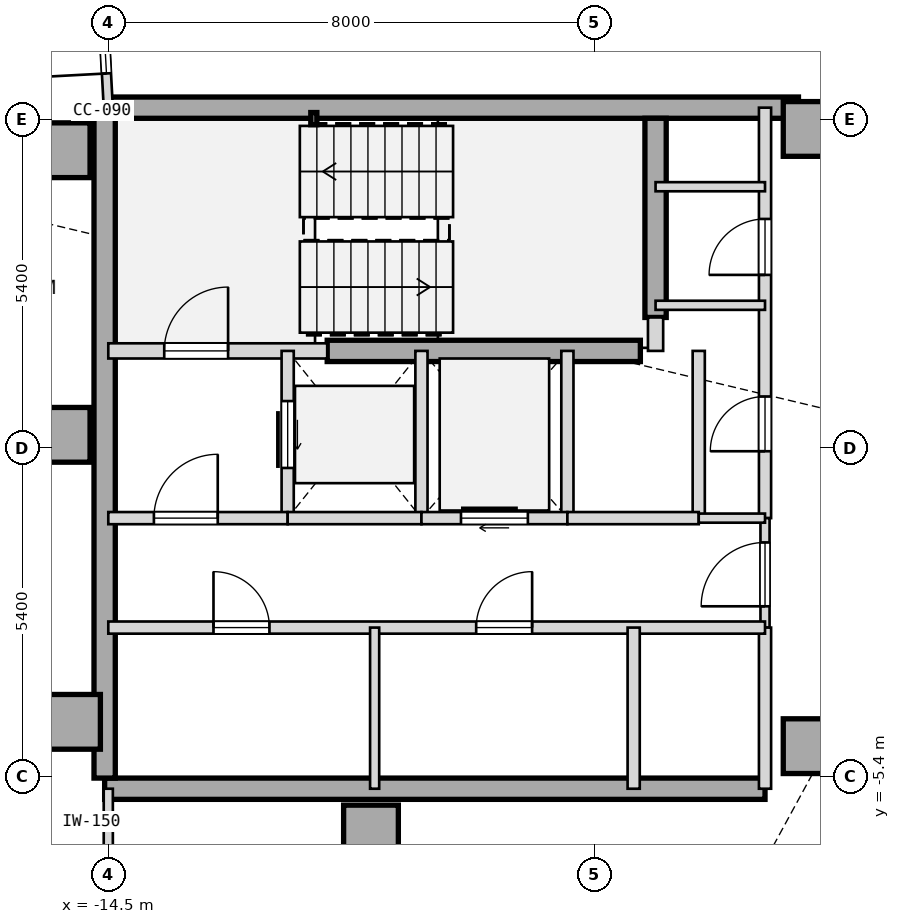
"""IFC4 building model, lengths in metres.
Left out: names, types, materials, properties, quantities, classifications, styles, units other than length and angle.
Written with IfcOpenShell. Run it as: python <this file> out.ifc"""

import sys

from ifc_helpers import new_model, si_unit, direction, frame, frame_2d, origin, origin_2d, place, context, subcontext, project, spatial, rectangle, hollow_rectangle, extrude, element, fill, save


model = new_model("IFC4")
c1 = context("Model", 3, precision=1e-05, world=origin(), true_north=direction((0.0, 1.0)))
c2 = subcontext(c1, "Body", "Model", "MODEL_VIEW")
j1 = project(units=[si_unit("LENGTHUNIT", "METRE"), si_unit("PLANEANGLEUNIT", "RADIAN")], contexts=[c1])
p1 = place(None, origin())
s1 = spatial("IfcSite", under=j1, at=p1, CompositionType="ELEMENT")
p2 = place(p1, origin())
s2 = spatial("IfcBuilding", under=s1, at=p2, CompositionType="ELEMENT")
p3 = place(p2, frame((0.0, 0.0, 305.55)))
s3 = spatial("IfcBuildingStorey", under=s2, at=p3, CompositionType="ELEMENT", Elevation=305.55)
for number, where, z_axis, x_axis in (
    (1, (-15.25, 4.9, 0.0), (0.0, 0.0, 1.0), (1.0, 0.0, 0.0)),
    (2, (-15.25, 0.22, 0.0), (0.0, 0.0, 1.0), (1.0, 0.0, 0.0)),
    (3, (-15.08, -4.5, 0.0), (0.0, 0.0, 1.0), (1.0, 0.0, 0.0)),
    (4, (-10.18, -6.32, 0.0), (0.0, 0.0, 1.0), (1.0, 0.0, 0.0)),
    (5, (-2.95, -4.9, 0.0), (0.0, 0.0, 1.0), (1.0, 0.0, 0.0)),
    (6, (-2.95, 5.25, 0.0), (0.0, 0.0, 1.0), (1.0, 0.0, 0.0)),
):
    element("IfcColumn", number, at=place(p3, frame(where, z_axis=z_axis, x_axis=x_axis)), inside=s3, PredefinedType="COLUMN", context=c2, shape_type="SweptSolid", body=[
        extrude(rectangle(XDim=0.9, YDim=0.9, at=origin_2d()), origin(), (0.0, 0.0, 1.0), 6.45),
    ])
p4 = place(p3, frame((-14.56, 5.6, 0.0), z_axis=(0.0, 0.0, 1.0), x_axis=(1.0, 0.0, 0.0)))
e7 = element("IfcWall", 7, at=p4, inside=s3, PredefinedType="SHEAR", context=c2, shape_type="SweptSolid", body=[
    extrude(rectangle(XDim=11.41, YDim=0.35, at=frame_2d((5.705, 0.0))), origin(), (0.0, 0.0, 1.0), 6.1),
])
p5 = place(p3, frame((-14.56, -5.6, 0.0), z_axis=(0.0, 0.0, 1.0), x_axis=(1.0, 0.0, 0.0)))
e8 = element("IfcWall", 8, at=p5, inside=s3, PredefinedType="SHEAR", context=c2, shape_type="SweptSolid", body=[
    extrude(rectangle(XDim=10.86, YDim=0.35, at=frame_2d((5.43, 0.0))), origin(), (0.0, 0.0, 1.0), 6.1),
])
p6 = place(p3, frame((-14.56, -5.425, 0.0), z_axis=(0.0, 0.0, 1.0), x_axis=(0.0, 1.0, 0.0)))
e9 = element("IfcWall", 9, at=p6, inside=s3, PredefinedType="SHEAR", context=c2, shape_type="SweptSolid", body=[
    extrude(rectangle(XDim=10.85, YDim=0.35, at=frame_2d((5.425, 0.0))), origin(), (0.0, 0.0, 1.0), 6.1),
])
p7 = place(p3, frame((-5.5, 2.15, 0.0), z_axis=(0.0, 0.0, 1.0), x_axis=(0.0, 1.0, 0.0)))
e10 = element("IfcWall", 10, at=p7, inside=s3, PredefinedType="SHEAR", context=c2, shape_type="SweptSolid", body=[
    extrude(rectangle(XDim=3.275, YDim=0.35, at=frame_2d((1.638, 0.0))), origin(), (0.0, 0.0, 1.0), 6.1),
])
p8 = place(p3, frame((-10.9, 1.6, 0.0), z_axis=(0.0, 0.0, 1.0), x_axis=(1.0, 0.0, 0.0)))
e11 = element("IfcWall", 11, at=p8, inside=s3, PredefinedType="SHEAR", context=c2, shape_type="SweptSolid", body=[
    extrude(rectangle(XDim=5.15, YDim=0.35, at=frame_2d((2.575, 0.0))), origin(), (0.0, 0.0, 1.0), 6.1),
])
p9 = place(p3, frame((-11.12, 5.42, 0.0), z_axis=(0.0, 0.0, 1.0), x_axis=(1.0, 0.0, 0.0)))
e12 = element("IfcColumn", 12, at=p9, inside=s3, PredefinedType="COLUMN", context=c2, shape_type="SweptSolid", body=[
    extrude(hollow_rectangle(XDim=0.1, YDim=0.2, WallThickness=0.008, at=origin_2d()), origin(), (0.0, 0.0, 1.0), 6.45),
])
for number, where, z_axis, x_axis in (
    (13, (-7.918, -17.756, 0.0), (0.0, 0.0, 1.0), (0.914, 0.407, 0.0)),
    (14, (7.918, 17.756, 0.0), (0.0, 0.0, 1.0), (-0.914, -0.407, 0.0)),
):
    element("IfcWall", number, at=place(p3, frame(where, z_axis=z_axis, x_axis=x_axis)), inside=s3, PredefinedType="STANDARD", context=c2, shape_type="SweptSolid", body=[
        extrude(rectangle(XDim=28.91, YDim=0.3, at=frame_2d((14.455, 0.0))), origin(), (0.0, 0.0, 1.0), 6.1),
    ])
p10 = place(p3, frame((-19.783, 2.637, 0.0), z_axis=(0.0, 0.0, 1.0), x_axis=(0.406736369999, -0.913545579224, 0.0)))
e15 = element("IfcWall", 15, at=p10, inside=s3, PredefinedType="STANDARD", context=c2, shape_type="SweptSolid", body=[
    extrude(rectangle(XDim=20.91, YDim=0.3, at=frame_2d((10.455, 0.0))), origin(), (0.0, 0.0, 1.0), 6.1),
])
p11 = place(p3, frame((18.04, 25.361, 0.0), z_axis=(0.0, 0.0, 1.0), x_axis=(-0.913545087995, -0.406737473317, 0.0)))
e16 = element("IfcWall", 16, at=p11, inside=s3, PredefinedType="PARAPET", context=c2, shape_type="SweptSolid", body=[
    extrude(rectangle(XDim=51.158, YDim=0.22, at=frame_2d((25.579, 0.0))), origin(), (0.0, 0.0, 1.0), 1.2),
])
p12 = place(p3, frame((-14.5, 1.6, 0.0), z_axis=(0.0, 0.0, 1.0), x_axis=(1.0, 0.0, 0.0)))
e17 = element("IfcWall", 17, at=p12, inside=s3, PredefinedType="STANDARD", context=c2, shape_type="SweptSolid", body=[
    extrude(rectangle(XDim=3.6, YDim=0.25, at=frame_2d((1.8, 0.0))), origin(), (0.0, 0.0, 1.0), 6.1),
])
p13 = place(p12, frame((0.92, 0.0, 0.0)))
e18 = element("IfcOpeningElement", 18, at=p13, cuts=e17, PredefinedType="OPENING", context=c2, shape_type="SweptSolid", body=[
    extrude(rectangle(XDim=1.05, YDim=2.15, at=frame_2d((0.525, 1.075))), frame((0.0, 0.135, 0.0), z_axis=(0.0, -1.0, 0.0), x_axis=(1.0, 0.0, 0.0)), (0.0, 0.0, 1.0), 0.27),
])
p14 = place(p3, frame((-5.5, 1.6, 0.0), z_axis=(0.0, 0.0, 1.0), x_axis=(0.0, 1.0, 0.0)))
e19 = element("IfcWall", 19, at=p14, inside=s3, PredefinedType="STANDARD", context=c2, shape_type="SweptSolid", body=[
    extrude(rectangle(XDim=0.55, YDim=0.25, at=frame_2d((0.275, 0.0))), origin(), (0.0, 0.0, 1.0), 6.1),
])
p15 = place(p3, frame((-3.7, -1.15, 0.0), z_axis=(0.0, 0.0, 1.0), x_axis=(0.0, 1.0, 0.0)))
e20 = element("IfcWall", 20, at=p15, inside=s3, PredefinedType="STANDARD", context=c2, shape_type="SweptSolid", body=[
    extrude(rectangle(XDim=6.75, YDim=0.2, at=frame_2d((3.375, 0.0))), origin(), (0.0, 0.0, 1.0), 6.1),
])
p16 = place(p15, frame((1.1, 0.0, 0.0)))
e21 = element("IfcOpeningElement", 21, at=p16, cuts=e20, PredefinedType="OPENING", context=c2, shape_type="SweptSolid", body=[
    extrude(rectangle(XDim=0.9, YDim=2.15, at=frame_2d((0.45, 1.075))), frame((0.0, 0.11, 0.0), z_axis=(0.0, -1.0, 0.0), x_axis=(1.0, 0.0, 0.0)), (0.0, 0.0, 1.0), 0.22),
])
p17 = place(p15, frame((4.0, 0.0, 0.0)))
e22 = element("IfcOpeningElement", 22, at=p17, cuts=e20, PredefinedType="OPENING", context=c2, shape_type="SweptSolid", body=[
    extrude(rectangle(XDim=0.92, YDim=2.15, at=frame_2d((0.46, 1.075))), frame((0.0, 0.11, 0.0), z_axis=(0.0, -1.0, 0.0), x_axis=(1.0, 0.0, 0.0)), (0.0, 0.0, 1.0), 0.22),
])
p18 = place(p3, frame((-3.7, -2.95, 0.0), z_axis=(0.0, 0.0, 1.0), x_axis=(0.0, 1.0, 0.0)))
e23 = element("IfcWall", 23, at=p18, inside=s3, PredefinedType="PARTITIONING", context=c2, shape_type="SweptSolid", body=[
    extrude(rectangle(XDim=1.8, YDim=0.15, at=frame_2d((0.9, 0.0))), origin(), (0.0, 0.0, 1.0), 6.1),
])
p19 = place(p18, frame((0.35, 0.0, 0.0)))
e24 = element("IfcOpeningElement", 24, at=p19, cuts=e23, PredefinedType="OPENING", context=c2, shape_type="SweptSolid", body=[
    extrude(rectangle(XDim=1.05, YDim=2.18, at=frame_2d((0.525, 1.09))), frame((0.0, 0.085, 0.0), z_axis=(0.0, -1.0, 0.0), x_axis=(1.0, 0.0, 0.0)), (0.0, 0.0, 1.0), 0.17),
])
p20 = place(p3, frame((-3.7, -5.6, 0.0), z_axis=(0.0, 0.0, 1.0), x_axis=(0.0, 1.0, 0.0)))
e25 = element("IfcWall", 25, at=p20, inside=s3, PredefinedType="STANDARD", context=c2, shape_type="SweptSolid", body=[
    extrude(rectangle(XDim=2.65, YDim=0.2, at=frame_2d((1.325, 0.0))), origin(), (0.0, 0.0, 1.0), 6.1),
])
p21 = place(p3, frame((-11.55, -1.15, 0.0), z_axis=(0.0, 0.0, 1.0), x_axis=(0.0, 1.0, 0.0)))
e26 = element("IfcWall", 26, at=p21, inside=s3, PredefinedType="STANDARD", context=c2, shape_type="SweptSolid", body=[
    extrude(rectangle(XDim=2.75, YDim=0.2, at=frame_2d((1.375, 0.0))), origin(), (0.0, 0.0, 1.0), 6.1),
])
p22 = place(p21, frame((0.825, 0.0, 0.0)))
e27 = element("IfcOpeningElement", 27, at=p22, cuts=e26, PredefinedType="OPENING", context=c2, shape_type="SweptSolid", body=[
    extrude(rectangle(XDim=1.1, YDim=2.15, at=frame_2d((0.55, 1.075))), frame((0.0, 0.11, 0.0), z_axis=(0.0, -1.0, 0.0), x_axis=(1.0, 0.0, 0.0)), (0.0, 0.0, 1.0), 0.22),
])
p23 = place(p3, frame((-9.35, -1.15, 0.0), z_axis=(0.0, 0.0, 1.0), x_axis=(0.0, 1.0, 0.0)))
e28 = element("IfcWall", 28, at=p23, inside=s3, PredefinedType="STANDARD", context=c2, shape_type="SweptSolid", body=[
    extrude(rectangle(XDim=2.75, YDim=0.2, at=frame_2d((1.375, 0.0))), origin(), (0.0, 0.0, 1.0), 6.1),
])
p24 = place(p3, frame((-14.5, -1.15, 0.0), z_axis=(0.0, 0.0, 1.0), x_axis=(1.0, 0.0, 0.0)))
e29 = element("IfcWall", 29, at=p24, inside=s3, PredefinedType="STANDARD", context=c2, shape_type="SweptSolid", body=[
    extrude(rectangle(XDim=2.95, YDim=0.2, at=frame_2d((1.475, 0.0))), origin(), (0.0, 0.0, 1.0), 6.1),
])
p25 = place(p24, frame((0.75, 0.0, 0.0)))
e30 = element("IfcOpeningElement", 30, at=p25, cuts=e29, PredefinedType="OPENING", context=c2, shape_type="SweptSolid", body=[
    extrude(rectangle(XDim=1.05, YDim=2.18, at=frame_2d((0.525, 1.09))), frame((0.0, 0.11, 0.0), z_axis=(0.0, -1.0, 0.0), x_axis=(1.0, 0.0, 0.0)), (0.0, 0.0, 1.0), 0.22),
])
p26 = place(p3, frame((-11.55, -1.15, 0.0), z_axis=(0.0, 0.0, 1.0), x_axis=(1.0, 0.0, 0.0)))
e31 = element("IfcWall", 31, at=p26, inside=s3, PredefinedType="STANDARD", context=c2, shape_type="SweptSolid", body=[
    extrude(rectangle(XDim=2.2, YDim=0.2, at=frame_2d((1.1, 0.0))), origin(), (0.0, 0.0, 1.0), 6.1),
])
p27 = place(p3, frame((-6.95, -1.15, 0.0), z_axis=(0.0, 0.0, 1.0), x_axis=(0.0, 1.0, 0.0)))
e32 = element("IfcWall", 32, at=p27, inside=s3, PredefinedType="STANDARD", context=c2, shape_type="SweptSolid", body=[
    extrude(rectangle(XDim=2.75, YDim=0.2, at=frame_2d((1.375, 0.0))), origin(), (0.0, 0.0, 1.0), 6.1),
])
p28 = place(p3, frame((-9.35, -1.15, 0.0), z_axis=(0.0, 0.0, 1.0), x_axis=(1.0, 0.0, 0.0)))
e33 = element("IfcWall", 33, at=p28, inside=s3, PredefinedType="STANDARD", context=c2, shape_type="SweptSolid", body=[
    extrude(rectangle(XDim=2.4, YDim=0.2, at=frame_2d((1.2, 0.0))), origin(), (0.0, 0.0, 1.0), 6.1),
])
p29 = place(p28, frame((0.65, 0.0, 0.0)))
e34 = element("IfcOpeningElement", 34, at=p29, cuts=e33, PredefinedType="OPENING", context=c2, shape_type="SweptSolid", body=[
    extrude(rectangle(XDim=1.1, YDim=2.15, at=frame_2d((0.55, 1.075))), frame((0.0, 0.11, 0.0), z_axis=(0.0, -1.0, 0.0), x_axis=(1.0, 0.0, 0.0)), (0.0, 0.0, 1.0), 0.22),
])
p30 = place(p3, frame((-4.79, -1.15, 0.0), z_axis=(0.0, 0.0, 1.0), x_axis=(0.0, 1.0, 0.0)))
e35 = element("IfcWall", 35, at=p30, inside=s3, PredefinedType="STANDARD", context=c2, shape_type="SweptSolid", body=[
    extrude(rectangle(XDim=2.75, YDim=0.2, at=frame_2d((1.375, 0.0))), origin(), (0.0, 0.0, 1.0), 6.1),
])
p31 = place(p3, frame((-6.95, -1.15, 0.0), z_axis=(0.0, 0.0, 1.0), x_axis=(1.0, 0.0, 0.0)))
e36 = element("IfcWall", 36, at=p31, inside=s3, PredefinedType="STANDARD", context=c2, shape_type="SweptSolid", body=[
    extrude(rectangle(XDim=2.16, YDim=0.2, at=frame_2d((1.08, 0.0))), origin(), (0.0, 0.0, 1.0), 6.1),
])
p32 = place(p3, frame((-4.79, -1.15, 0.0), z_axis=(0.0, 0.0, 1.0), x_axis=(1.0, 0.0, 0.0)))
e37 = element("IfcWall", 37, at=p32, inside=s3, PredefinedType="PARTITIONING", context=c2, shape_type="SweptSolid", body=[
    extrude(rectangle(XDim=1.09, YDim=0.15, at=frame_2d((0.545, 0.0))), origin(), (0.0, 0.0, 1.0), 6.1),
])
p33 = place(p3, frame((-14.5, -2.95, 0.0), z_axis=(0.0, 0.0, 1.0), x_axis=(1.0, 0.0, 0.0)))
e38 = element("IfcWall", 38, at=p33, inside=s3, PredefinedType="STANDARD", context=c2, shape_type="SweptSolid", body=[
    extrude(rectangle(XDim=10.8, YDim=0.2, at=frame_2d((5.4, 0.0))), origin(), (0.0, 0.0, 1.0), 6.1),
])
p34 = place(p33, frame((1.73, 0.0, 0.0)))
e39 = element("IfcOpeningElement", 39, at=p34, cuts=e38, PredefinedType="OPENING", context=c2, shape_type="SweptSolid", body=[
    extrude(rectangle(XDim=0.92, YDim=2.15, at=frame_2d((0.46, 1.075))), frame((0.0, 0.11, 0.0), z_axis=(0.0, -1.0, 0.0), x_axis=(1.0, 0.0, 0.0)), (0.0, 0.0, 1.0), 0.22),
])
p35 = place(p33, frame((6.05, 0.0, 0.0)))
e40 = element("IfcOpeningElement", 40, at=p35, cuts=e38, PredefinedType="OPENING", context=c2, shape_type="SweptSolid", body=[
    extrude(rectangle(XDim=0.92, YDim=2.15, at=frame_2d((0.46, 1.075))), frame((0.0, 0.11, 0.0), z_axis=(0.0, -1.0, 0.0), x_axis=(1.0, 0.0, 0.0)), (0.0, 0.0, 1.0), 0.22),
])
p36 = place(p3, frame((-5.86, -5.6, 0.0), z_axis=(0.0, 0.0, 1.0), x_axis=(0.0, 1.0, 0.0)))
e41 = element("IfcWall", 41, at=p36, inside=s3, PredefinedType="STANDARD", context=c2, shape_type="SweptSolid", body=[
    extrude(rectangle(XDim=2.65, YDim=0.2, at=frame_2d((1.325, 0.0))), origin(), (0.0, 0.0, 1.0), 6.1),
])
p37 = place(p3, frame((-10.12, -5.6, 0.0), z_axis=(0.0, 0.0, 1.0), x_axis=(0.0, 1.0, 0.0)))
e42 = element("IfcWall", 42, at=p37, inside=s3, PredefinedType="PARTITIONING", context=c2, shape_type="SweptSolid", body=[
    extrude(rectangle(XDim=2.65, YDim=0.15, at=frame_2d((1.325, 0.0))), origin(), (0.0, 0.0, 1.0), 6.1),
])
for number, where, z_axis, x_axis in (
    (43, (-5.5, 4.3, 0.0), (0.0, 0.0, 1.0), (1.0, 0.0, 0.0)),
    (44, (-5.5, 2.35, 0.0), (0.0, 0.0, 1.0), (1.0, 0.0, 0.0)),
):
    element("IfcWall", number, at=place(p3, frame(where, z_axis=z_axis, x_axis=x_axis)), inside=s3, PredefinedType="PARTITIONING", context=c2, shape_type="SweptSolid", body=[
        extrude(rectangle(XDim=1.8, YDim=0.15, at=frame_2d((0.9, 0.0))), origin(), (0.0, 0.0, 1.0), 6.1),
    ])
p38 = place(p3, frame((-14.5, -7.2, 0.0), z_axis=(0.0, 0.0, 1.0), x_axis=(0.0, 1.0, 0.0)))
e45 = element("IfcWall", 45, at=p38, inside=s3, PredefinedType="PARTITIONING", context=c2, shape_type="SweptSolid", body=[
    extrude(rectangle(XDim=1.6, YDim=0.15, at=frame_2d((0.8, 0.0))), origin(), (0.0, 0.0, 1.0), 6.1),
])
p39 = place(p3, frame((-14.5, 5.6, 0.0), z_axis=(0.0, 0.0, 1.0), x_axis=(-0.053607139023, 0.99856210355, 0.0)))
e46 = element("IfcWall", 46, at=p39, inside=s3, PredefinedType="PARTITIONING", context=c2, shape_type="SweptSolid", body=[
    extrude(rectangle(XDim=2.127, YDim=0.15, at=frame_2d((1.063, 0.0))), origin(), (0.0, 0.0, 1.0), 6.1),
])
p40 = place(p39, frame((0.563, 0.0, 0.0)))
e47 = element("IfcOpeningElement", 47, at=p40, cuts=e46, PredefinedType="OPENING", context=c2, shape_type="SweptSolid", body=[
    extrude(rectangle(XDim=1.0, YDim=2.15, at=frame_2d((0.5, 1.075))), frame((0.0, 0.085, 0.0), z_axis=(0.0, -1.0, 0.0), x_axis=(1.0, 0.0, 0.0)), (0.0, 0.0, 1.0), 0.17),
])
p41 = place(p13, origin())
e48 = element("IfcDoor", 48, at=p41, inside=s3, OperationType="SINGLE_SWING_RIGHT", PredefinedType="DOOR", context=c2, shape_type="SweptSolid", body=[
    extrude(rectangle(XDim=1.05, YDim=2.15, at=frame_2d((0.525, 1.075))), frame((0.0, 0.025, 0.0), z_axis=(0.0, -1.0, 0.0), x_axis=(1.0, 0.0, 0.0)), (0.0, 0.0, 1.0), 0.05),
])
fill(e18, e48)
p42 = place(p25, origin())
e49 = element("IfcDoor", 49, at=p42, inside=s3, OperationType="SINGLE_SWING_RIGHT", PredefinedType="DOOR", context=c2, shape_type="SweptSolid", body=[
    extrude(rectangle(XDim=1.05, YDim=2.18, at=frame_2d((0.525, 1.09))), frame((0.0, 0.025, 0.0), z_axis=(0.0, -1.0, 0.0), x_axis=(1.0, 0.0, 0.0)), (0.0, 0.0, 1.0), 0.05),
])
fill(e30, e49)
p43 = place(p19, origin())
e50 = element("IfcDoor", 50, at=p43, inside=s3, OperationType="SINGLE_SWING_LEFT", PredefinedType="DOOR", context=c2, shape_type="SweptSolid", body=[
    extrude(rectangle(XDim=1.05, YDim=2.18, at=frame_2d((0.525, 1.09))), frame((0.0, 0.025, 0.0), z_axis=(0.0, -1.0, 0.0), x_axis=(1.0, 0.0, 0.0)), (0.0, 0.0, 1.0), 0.05),
])
fill(e24, e50)
p44 = place(p22, origin())
e51 = element("IfcDoor", 51, at=p44, inside=s3, OperationType="SLIDING_TO_RIGHT", PredefinedType="DOOR", context=c2, shape_type="SweptSolid", body=[
    extrude(rectangle(XDim=1.1, YDim=2.15, at=frame_2d((0.55, 1.075))), frame((0.0, 0.025, 0.0), z_axis=(0.0, -1.0, 0.0), x_axis=(1.0, 0.0, 0.0)), (0.0, 0.0, 1.0), 0.05),
])
fill(e27, e51)
p45 = place(p29, origin())
e52 = element("IfcDoor", 52, at=p45, inside=s3, OperationType="SLIDING_TO_RIGHT", PredefinedType="DOOR", context=c2, shape_type="SweptSolid", body=[
    extrude(rectangle(XDim=1.1, YDim=2.15, at=frame_2d((0.55, 1.075))), frame((0.0, 0.025, 0.0), z_axis=(0.0, -1.0, 0.0), x_axis=(1.0, 0.0, 0.0)), (0.0, 0.0, 1.0), 0.05),
])
fill(e34, e52)
p46 = place(p34, origin())
e53 = element("IfcDoor", 53, at=p46, inside=s3, OperationType="SINGLE_SWING_LEFT", PredefinedType="DOOR", context=c2, shape_type="SweptSolid", body=[
    extrude(rectangle(XDim=0.92, YDim=2.15, at=frame_2d((0.46, 1.075))), frame((0.0, 0.025, 0.0), z_axis=(0.0, -1.0, 0.0), x_axis=(1.0, 0.0, 0.0)), (0.0, 0.0, 1.0), 0.05),
])
fill(e39, e53)
p47 = place(p35, origin())
e54 = element("IfcDoor", 54, at=p47, inside=s3, OperationType="SINGLE_SWING_RIGHT", PredefinedType="DOOR", context=c2, shape_type="SweptSolid", body=[
    extrude(rectangle(XDim=0.92, YDim=2.15, at=frame_2d((0.46, 1.075))), frame((0.0, 0.025, 0.0), z_axis=(0.0, -1.0, 0.0), x_axis=(1.0, 0.0, 0.0)), (0.0, 0.0, 1.0), 0.05),
])
fill(e40, e54)
p48 = place(p16, origin())
e55 = element("IfcDoor", 55, at=p48, inside=s3, OperationType="SINGLE_SWING_LEFT", PredefinedType="DOOR", context=c2, shape_type="SweptSolid", body=[
    extrude(rectangle(XDim=0.9, YDim=2.15, at=frame_2d((0.45, 1.075))), frame((0.0, 0.025, 0.0), z_axis=(0.0, -1.0, 0.0), x_axis=(1.0, 0.0, 0.0)), (0.0, 0.0, 1.0), 0.05),
])
fill(e21, e55)
p49 = place(p17, origin())
e56 = element("IfcDoor", 56, at=p49, inside=s3, OperationType="SINGLE_SWING_LEFT", PredefinedType="DOOR", context=c2, shape_type="SweptSolid", body=[
    extrude(rectangle(XDim=0.92, YDim=2.15, at=frame_2d((0.46, 1.075))), frame((0.0, 0.025, 0.0), z_axis=(0.0, -1.0, 0.0), x_axis=(1.0, 0.0, 0.0)), (0.0, 0.0, 1.0), 0.05),
])
fill(e22, e56)
p50 = place(p40, origin())
e57 = element("IfcDoor", 57, at=p50, inside=s3, OperationType="SINGLE_SWING_LEFT", PredefinedType="DOOR", context=c2, shape_type="SweptSolid", body=[
    extrude(rectangle(XDim=1.0, YDim=2.15, at=frame_2d((0.5, 1.075))), frame((0.0, 0.025, 0.0), z_axis=(0.0, -1.0, 0.0), x_axis=(1.0, 0.0, 0.0)), (0.0, 0.0, 1.0), 0.05),
])
fill(e47, e57)
save(model, sys.argv[1])
